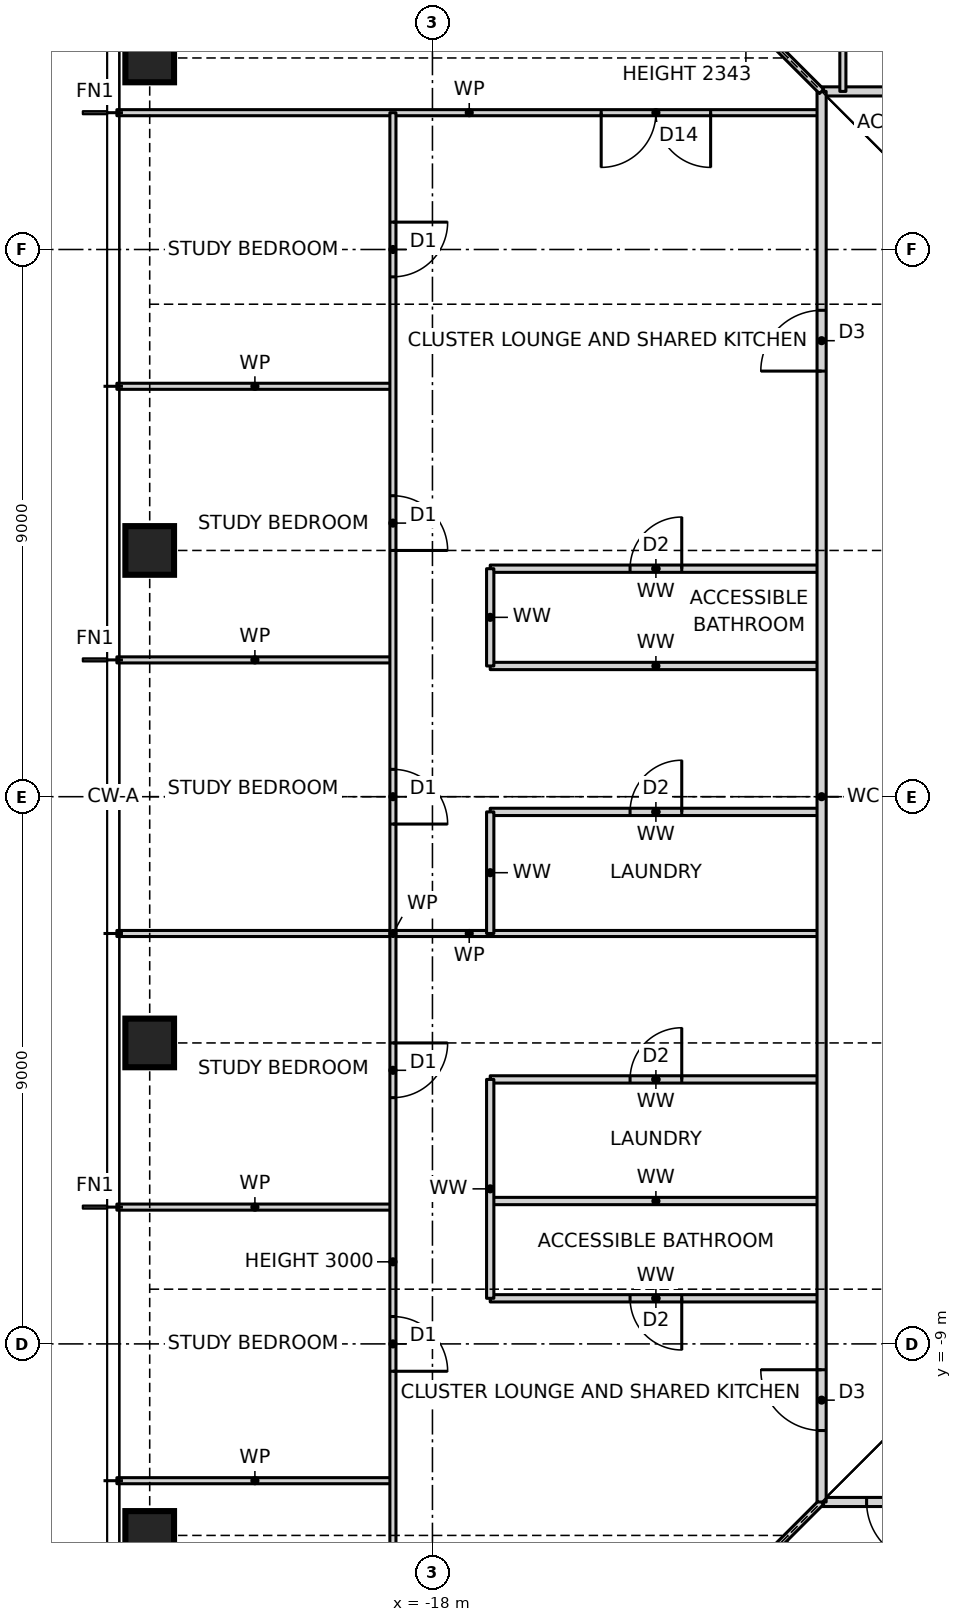
"""IFC4 building model, lengths in metres.
Left out: names, types, materials, properties, quantities, classifications, styles, units other than length and angle.
Written with IfcOpenShell. Run it as: python <this file> out.ifc"""

import sys

from ifc_helpers import new_model, si_unit, direction, frame, frame_2d, origin, origin_2d, place, context, subcontext, project, spatial, rectangle, hollow_rectangle, extrude, element, fill, save


model = new_model("IFC4")
c1 = context("Model", 3, precision=1e-05, world=origin(), true_north=direction((0.0, 1.0)))
c2 = subcontext(c1, "Body", "Model", "MODEL_VIEW")
j1 = project(units=[si_unit("LENGTHUNIT", "METRE"), si_unit("PLANEANGLEUNIT", "RADIAN")], contexts=[c1])
p1 = place(None, origin())
s1 = spatial("IfcSite", under=j1, at=p1, CompositionType="ELEMENT")
p2 = place(p1, origin())
s2 = spatial("IfcBuilding", under=s1, at=p2, CompositionType="ELEMENT")
p3 = place(p2, frame((0.0, 0.0, 67.5)))
s3 = spatial("IfcBuildingStorey", under=s2, at=p3, CompositionType="ELEMENT", Elevation=67.5)
for number, where, z_axis, x_axis in (
    (1, (-22.65, 12.15, 0.0), (0.0, 0.0, 1.0), (1.0, 0.0, 0.0)),
    (2, (-22.65, 4.05, 0.0), (0.0, 0.0, 1.0), (1.0, 0.0, 0.0)),
    (3, (-22.65, -4.05, 0.0), (0.0, 0.0, 1.0), (1.0, 0.0, 0.0)),
    (4, (-22.65, -12.15, 0.0), (0.0, 0.0, 1.0), (1.0, 0.0, 0.0)),
):
    element("IfcColumn", number, at=place(p3, frame(where, z_axis=z_axis, x_axis=x_axis)), inside=s3, PredefinedType="COLUMN", context=c2, shape_type="SweptSolid", body=[
        extrude(hollow_rectangle(XDim=0.8, YDim=0.8, WallThickness=0.09, at=origin_2d()), origin(), (0.0, 0.0, 1.0), 3.5),
    ])
p4 = place(p3, frame((-11.6, -11.6, 0.0), z_axis=(0.0, 0.0, 1.0), x_axis=(1.0, 0.0, 0.0)))
e5 = element("IfcWall", 5, at=p4, inside=s3, PredefinedType="PARTITIONING", context=c2, shape_type="SweptSolid", body=[
    extrude(rectangle(XDim=24.2, YDim=0.15, at=frame_2d((12.1, 0.0))), origin(), (0.0, 0.0, 1.0), 3.27),
])
p5 = place(p4, frame((0.74, 0.0, 0.0)))
e6 = element("IfcOpeningElement", 6, at=p5, cuts=e5, PredefinedType="OPENING", context=c2, shape_type="SweptSolid", body=[
    extrude(rectangle(XDim=1.0, YDim=2.1, at=frame_2d((0.5, 1.05))), frame((0.0, 0.085, 0.0), z_axis=(0.0, -1.0, 0.0), x_axis=(1.0, 0.0, 0.0)), (0.0, 0.0, 1.0), 0.17),
])
p6 = place(p4, frame((21.025, 0.0, 0.0)))
e7 = element("IfcOpeningElement", 7, at=p6, cuts=e5, PredefinedType="OPENING", context=c2, shape_type="SweptSolid", body=[
    extrude(rectangle(XDim=1.0, YDim=2.1, at=frame_2d((0.5, 1.05))), frame((0.0, 0.085, 0.0), z_axis=(0.0, -1.0, 0.0), x_axis=(1.0, 0.0, 0.0)), (0.0, 0.0, 1.0), 0.17),
])
p7 = place(p3, frame((-23.19, -11.25, 0.0), z_axis=(0.0, 0.0, 1.0), x_axis=(1.0, 0.0, 0.0)))
e8 = element("IfcWall", 8, at=p7, inside=s3, PredefinedType="PARTITIONING", context=c2, shape_type="SweptSolid", body=[
    extrude(rectangle(XDim=4.54, YDim=0.1, at=frame_2d((2.27, 0.0))), origin(), (0.0, 0.0, 1.0), 3.27),
])
p8 = place(p3, frame((-17.05, -8.25, 0.0), z_axis=(0.0, 0.0, 1.0), x_axis=(1.0, 0.0, 0.0)))
e9 = element("IfcWall", 9, at=p8, inside=s3, PredefinedType="PARTITIONING", context=c2, shape_type="SweptSolid", body=[
    extrude(rectangle(XDim=5.45, YDim=0.12, at=frame_2d((2.725, 0.0))), origin(), (0.0, 0.0, 1.0), 3.27),
])
p9 = place(p8, frame((2.3, 0.0, 0.0)))
e10 = element("IfcOpeningElement", 10, at=p9, cuts=e9, PredefinedType="OPENING", context=c2, shape_type="SweptSolid", body=[
    extrude(rectangle(XDim=0.85, YDim=2.1, at=frame_2d((0.425, 1.05))), frame((0.0, 0.07, 0.0), z_axis=(0.0, -1.0, 0.0), x_axis=(1.0, 0.0, 0.0)), (0.0, 0.0, 1.0), 0.14),
])
p10 = place(p3, frame((-23.19, -6.75, 0.0), z_axis=(0.0, 0.0, 1.0), x_axis=(1.0, 0.0, 0.0)))
e11 = element("IfcWall", 11, at=p10, inside=s3, PredefinedType="PARTITIONING", context=c2, shape_type="SweptSolid", body=[
    extrude(rectangle(XDim=4.54, YDim=0.1, at=frame_2d((2.27, 0.0))), origin(), (0.0, 0.0, 1.0), 3.27),
])
p11 = place(p3, frame((-17.05, -6.65, 0.0), z_axis=(0.0, 0.0, 1.0), x_axis=(1.0, 0.0, 0.0)))
e12 = element("IfcWall", 12, at=p11, inside=s3, PredefinedType="PARTITIONING", context=c2, shape_type="SweptSolid", body=[
    extrude(rectangle(XDim=5.45, YDim=0.12, at=frame_2d((2.725, 0.0))), origin(), (0.0, 0.0, 1.0), 3.27),
])
p12 = place(p3, frame((-17.05, -4.65, 0.0), z_axis=(0.0, 0.0, 1.0), x_axis=(1.0, 0.0, 0.0)))
e13 = element("IfcWall", 13, at=p12, inside=s3, PredefinedType="PARTITIONING", context=c2, shape_type="SweptSolid", body=[
    extrude(rectangle(XDim=5.45, YDim=0.12, at=frame_2d((2.725, 0.0))), origin(), (0.0, 0.0, 1.0), 3.27),
])
p13 = place(p12, frame((2.3, 0.0, 0.0)))
e14 = element("IfcOpeningElement", 14, at=p13, cuts=e13, PredefinedType="OPENING", context=c2, shape_type="SweptSolid", body=[
    extrude(rectangle(XDim=0.85, YDim=2.1, at=frame_2d((0.425, 1.05))), frame((0.0, 0.07, 0.0), z_axis=(0.0, -1.0, 0.0), x_axis=(1.0, 0.0, 0.0)), (0.0, 0.0, 1.0), 0.14),
])
p14 = place(p3, frame((-23.19, -2.25, 0.0), z_axis=(0.0, 0.0, 1.0), x_axis=(1.0, 0.0, 0.0)))
e15 = element("IfcWall", 15, at=p14, inside=s3, PredefinedType="PARTITIONING", context=c2, shape_type="SweptSolid", body=[
    extrude(rectangle(XDim=11.59, YDim=0.1, at=frame_2d((5.795, 0.0))), origin(), (0.0, 0.0, 1.0), 3.27),
])
p15 = place(p3, frame((-17.05, -0.25, 0.0), z_axis=(0.0, 0.0, 1.0), x_axis=(1.0, 0.0, 0.0)))
e16 = element("IfcWall", 16, at=p15, inside=s3, PredefinedType="PARTITIONING", context=c2, shape_type="SweptSolid", body=[
    extrude(rectangle(XDim=5.45, YDim=0.12, at=frame_2d((2.725, 0.0))), origin(), (0.0, 0.0, 1.0), 3.27),
])
p16 = place(p15, frame((2.3, 0.0, 0.0)))
e17 = element("IfcOpeningElement", 17, at=p16, cuts=e16, PredefinedType="OPENING", context=c2, shape_type="SweptSolid", body=[
    extrude(rectangle(XDim=0.85, YDim=2.1, at=frame_2d((0.425, 1.05))), frame((0.0, 0.07, 0.0), z_axis=(0.0, -1.0, 0.0), x_axis=(1.0, 0.0, 0.0)), (0.0, 0.0, 1.0), 0.14),
])
p17 = place(p3, frame((-17.05, 2.15, 0.0), z_axis=(0.0, 0.0, 1.0), x_axis=(1.0, 0.0, 0.0)))
e18 = element("IfcWall", 18, at=p17, inside=s3, PredefinedType="PARTITIONING", context=c2, shape_type="SweptSolid", body=[
    extrude(rectangle(XDim=5.45, YDim=0.12, at=frame_2d((2.725, 0.0))), origin(), (0.0, 0.0, 1.0), 3.27),
])
p18 = place(p3, frame((-23.19, 2.25, 0.0), z_axis=(0.0, 0.0, 1.0), x_axis=(1.0, 0.0, 0.0)))
e19 = element("IfcWall", 19, at=p18, inside=s3, PredefinedType="PARTITIONING", context=c2, shape_type="SweptSolid", body=[
    extrude(rectangle(XDim=4.54, YDim=0.1, at=frame_2d((2.27, 0.0))), origin(), (0.0, 0.0, 1.0), 3.27),
])
p19 = place(p3, frame((-17.05, 3.75, 0.0), z_axis=(0.0, 0.0, 1.0), x_axis=(1.0, 0.0, 0.0)))
e20 = element("IfcWall", 20, at=p19, inside=s3, PredefinedType="PARTITIONING", context=c2, shape_type="SweptSolid", body=[
    extrude(rectangle(XDim=5.45, YDim=0.12, at=frame_2d((2.725, 0.0))), origin(), (0.0, 0.0, 1.0), 3.27),
])
p20 = place(p19, frame((2.3, 0.0, 0.0)))
e21 = element("IfcOpeningElement", 21, at=p20, cuts=e20, PredefinedType="OPENING", context=c2, shape_type="SweptSolid", body=[
    extrude(rectangle(XDim=0.85, YDim=2.1, at=frame_2d((0.425, 1.05))), frame((0.0, 0.07, 0.0), z_axis=(0.0, -1.0, 0.0), x_axis=(1.0, 0.0, 0.0)), (0.0, 0.0, 1.0), 0.14),
])
p21 = place(p3, frame((-23.19, 6.75, 0.0), z_axis=(0.0, 0.0, 1.0), x_axis=(1.0, 0.0, 0.0)))
e22 = element("IfcWall", 22, at=p21, inside=s3, PredefinedType="PARTITIONING", context=c2, shape_type="SweptSolid", body=[
    extrude(rectangle(XDim=4.54, YDim=0.1, at=frame_2d((2.27, 0.0))), origin(), (0.0, 0.0, 1.0), 3.27),
])
p22 = place(p3, frame((-23.19, 11.25, 0.0), z_axis=(0.0, 0.0, 1.0), x_axis=(1.0, 0.0, 0.0)))
e23 = element("IfcWall", 23, at=p22, inside=s3, PredefinedType="PARTITIONING", context=c2, shape_type="SweptSolid", body=[
    extrude(rectangle(XDim=11.59, YDim=0.1, at=frame_2d((5.795, 0.0))), origin(), (0.0, 0.0, 1.0), 3.27),
])
p23 = place(p22, frame((7.965, 0.0, 0.0)))
e24 = element("IfcOpeningElement", 24, at=p23, cuts=e23, PredefinedType="OPENING", context=c2, shape_type="SweptSolid", body=[
    extrude(rectangle(XDim=1.8, YDim=2.1, at=frame_2d((0.9, 1.05))), frame((0.0, 0.06, 0.0), z_axis=(0.0, -1.0, 0.0), x_axis=(1.0, 0.0, 0.0)), (0.0, 0.0, 1.0), 0.12),
])
p24 = place(p3, frame((-11.6, 11.6, 0.0), z_axis=(0.0, 0.0, 1.0), x_axis=(1.0, 0.0, 0.0)))
e25 = element("IfcWall", 25, at=p24, inside=s3, PredefinedType="PARTITIONING", context=c2, shape_type="SweptSolid", body=[
    extrude(rectangle(XDim=24.2, YDim=0.15, at=frame_2d((12.1, 0.0))), origin(), (0.0, 0.0, 1.0), 3.27),
])
p25 = place(p24, frame((7.95, 0.0, 0.0)))
e26 = element("IfcOpeningElement", 26, at=p25, cuts=e25, PredefinedType="OPENING", context=c2, shape_type="SweptSolid", body=[
    extrude(rectangle(XDim=1.0, YDim=2.1, at=frame_2d((0.5, 1.05))), frame((0.0, 0.085, 0.0), z_axis=(0.0, -1.0, 0.0), x_axis=(1.0, 0.0, 0.0)), (0.0, 0.0, 1.0), 0.17),
])
p26 = place(p24, frame((5.9, 0.0, 0.0)))
e27 = element("IfcOpeningElement", 27, at=p26, cuts=e25, PredefinedType="OPENING", context=c2, shape_type="SweptSolid", body=[
    extrude(rectangle(XDim=0.9, YDim=2.1, at=frame_2d((0.45, 1.05))), frame((0.0, 0.085, 0.0), z_axis=(0.0, -1.0, 0.0), x_axis=(1.0, 0.0, 0.0)), (0.0, 0.0, 1.0), 0.17),
])
p27 = place(p3, frame((-15.75, -15.75, 0.0), z_axis=(0.0, 0.0, 1.0), x_axis=(0.707106781187, 0.707106781187, 0.0)))
e28 = element("IfcWall", 28, at=p27, inside=s3, PredefinedType="PARTITIONING", context=c2, shape_type="SweptSolid", body=[
    extrude(rectangle(XDim=5.869, YDim=0.1, at=frame_2d((2.935, 0.0))), origin(), (0.0, 0.0, 1.0), 2.343),
])
p28 = place(p3, frame((-11.25, 11.6, 0.0), z_axis=(0.0, 0.0, 1.0), x_axis=(0.0, 1.0, 0.0)))
e29 = element("IfcWall", 29, at=p28, inside=s3, PredefinedType="PARTITIONING", context=c2, shape_type="SweptSolid", body=[
    extrude(rectangle(XDim=11.59, YDim=0.1, at=frame_2d((5.795, 0.0))), origin(), (0.0, 0.0, 1.0), 3.27),
])
p29 = place(p28, frame((5.825, 0.0, 0.0)))
e30 = element("IfcOpeningElement", 30, at=p29, cuts=e29, PredefinedType="OPENING", context=c2, shape_type="SweptSolid", body=[
    extrude(rectangle(XDim=0.85, YDim=2.1, at=frame_2d((0.425, 1.05))), frame((0.0, 0.06, 0.0), z_axis=(0.0, -1.0, 0.0), x_axis=(1.0, 0.0, 0.0)), (0.0, 0.0, 1.0), 0.12),
])
p30 = place(p3, frame((-11.6, -11.6, 0.0), z_axis=(0.0, 0.0, 1.0), x_axis=(0.0, 1.0, 0.0)))
e31 = element("IfcWall", 31, at=p30, inside=s3, PredefinedType="PARTITIONING", context=c2, shape_type="SweptSolid", body=[
    extrude(rectangle(XDim=23.2, YDim=0.15, at=frame_2d((11.6, 0.0))), origin(), (0.0, 0.0, 1.0), 3.27),
])
p31 = place(p30, frame((18.6, 0.0, 0.0)))
e32 = element("IfcOpeningElement", 32, at=p31, cuts=e31, PredefinedType="OPENING", context=c2, shape_type="SweptSolid", body=[
    extrude(rectangle(XDim=1.0, YDim=2.1, at=frame_2d((0.5, 1.05))), frame((0.0, 0.085, 0.0), z_axis=(0.0, -1.0, 0.0), x_axis=(1.0, 0.0, 0.0)), (0.0, 0.0, 1.0), 0.17),
])
p32 = place(p30, frame((1.175, 0.0, 0.0)))
e33 = element("IfcOpeningElement", 33, at=p32, cuts=e31, PredefinedType="OPENING", context=c2, shape_type="SweptSolid", body=[
    extrude(rectangle(XDim=1.0, YDim=2.1, at=frame_2d((0.5, 1.05))), frame((0.0, 0.085, 0.0), z_axis=(0.0, -1.0, 0.0), x_axis=(1.0, 0.0, 0.0)), (0.0, 0.0, 1.0), 0.17),
])
p33 = place(p3, frame((-17.05, -8.25, 0.0), z_axis=(0.0, 0.0, 1.0), x_axis=(0.0, 1.0, 0.0)))
e34 = element("IfcWall", 34, at=p33, inside=s3, PredefinedType="PARTITIONING", context=c2, shape_type="SweptSolid", body=[
    extrude(rectangle(XDim=3.6, YDim=0.12, at=frame_2d((1.8, 0.0))), origin(), (0.0, 0.0, 1.0), 3.27),
])
p34 = place(p3, frame((-17.05, -2.25, 0.0), z_axis=(0.0, 0.0, 1.0), x_axis=(0.0, 1.0, 0.0)))
e35 = element("IfcWall", 35, at=p34, inside=s3, PredefinedType="PARTITIONING", context=c2, shape_type="SweptSolid", body=[
    extrude(rectangle(XDim=2.0, YDim=0.12, at=frame_2d((1.0, 0.0))), origin(), (0.0, 0.0, 1.0), 3.27),
])
p35 = place(p3, frame((-17.05, 2.15, 0.0), z_axis=(0.0, 0.0, 1.0), x_axis=(0.0, 1.0, 0.0)))
e36 = element("IfcWall", 36, at=p35, inside=s3, PredefinedType="PARTITIONING", context=c2, shape_type="SweptSolid", body=[
    extrude(rectangle(XDim=1.6, YDim=0.12, at=frame_2d((0.8, 0.0))), origin(), (0.0, 0.0, 1.0), 3.27),
])
p36 = place(p3, frame((-18.65, -15.75, 0.0), z_axis=(0.0, 0.0, 1.0), x_axis=(0.0, 1.0, 0.0)))
e37 = element("IfcWall", 37, at=p36, inside=s3, PredefinedType="PARTITIONING", context=c2, shape_type="SweptSolid", body=[
    extrude(rectangle(XDim=27.0, YDim=0.1, at=frame_2d((13.5, 0.0))), origin(), (0.0, 0.0, 1.0), 3.0),
])
p37 = place(p36, frame((24.3, 0.0, 0.0)))
e38 = element("IfcOpeningElement", 38, at=p37, cuts=e37, PredefinedType="OPENING", context=c2, shape_type="SweptSolid", body=[
    extrude(rectangle(XDim=0.9, YDim=2.1, at=frame_2d((0.45, 1.05))), frame((0.0, 0.06, 0.0), z_axis=(0.0, -1.0, 0.0), x_axis=(1.0, 0.0, 0.0)), (0.0, 0.0, 1.0), 0.12),
])
p38 = place(p36, frame((19.8, 0.0, 0.0)))
e39 = element("IfcOpeningElement", 39, at=p38, cuts=e37, PredefinedType="OPENING", context=c2, shape_type="SweptSolid", body=[
    extrude(rectangle(XDim=0.9, YDim=2.1, at=frame_2d((0.45, 1.05))), frame((0.0, 0.06, 0.0), z_axis=(0.0, -1.0, 0.0), x_axis=(1.0, 0.0, 0.0)), (0.0, 0.0, 1.0), 0.12),
])
p39 = place(p36, frame((15.3, 0.0, 0.0)))
e40 = element("IfcOpeningElement", 40, at=p39, cuts=e37, PredefinedType="OPENING", context=c2, shape_type="SweptSolid", body=[
    extrude(rectangle(XDim=0.9, YDim=2.1, at=frame_2d((0.45, 1.05))), frame((0.0, 0.06, 0.0), z_axis=(0.0, -1.0, 0.0), x_axis=(1.0, 0.0, 0.0)), (0.0, 0.0, 1.0), 0.12),
])
p40 = place(p36, frame((10.8, 0.0, 0.0)))
e41 = element("IfcOpeningElement", 41, at=p40, cuts=e37, PredefinedType="OPENING", context=c2, shape_type="SweptSolid", body=[
    extrude(rectangle(XDim=0.9, YDim=2.1, at=frame_2d((0.45, 1.05))), frame((0.0, 0.06, 0.0), z_axis=(0.0, -1.0, 0.0), x_axis=(1.0, 0.0, 0.0)), (0.0, 0.0, 1.0), 0.12),
])
p41 = place(p36, frame((6.3, 0.0, 0.0)))
e42 = element("IfcOpeningElement", 42, at=p41, cuts=e37, PredefinedType="OPENING", context=c2, shape_type="SweptSolid", body=[
    extrude(rectangle(XDim=0.9, YDim=2.1, at=frame_2d((0.45, 1.05))), frame((0.0, 0.06, 0.0), z_axis=(0.0, -1.0, 0.0), x_axis=(1.0, 0.0, 0.0)), (0.0, 0.0, 1.0), 0.12),
])
p42 = place(p36, frame((1.8, 0.0, 0.0)))
e43 = element("IfcOpeningElement", 43, at=p42, cuts=e37, PredefinedType="OPENING", context=c2, shape_type="SweptSolid", body=[
    extrude(rectangle(XDim=0.9, YDim=2.1, at=frame_2d((0.45, 1.05))), frame((0.0, 0.06, 0.0), z_axis=(0.0, -1.0, 0.0), x_axis=(1.0, 0.0, 0.0)), (0.0, 0.0, 1.0), 0.12),
])
p43 = place(p3, frame((-11.6, 11.6, 0.0), z_axis=(0.0, 0.0, 1.0), x_axis=(-0.707106781187, 0.707106781187, 0.0)))
e44 = element("IfcWall", 44, at=p43, inside=s3, PredefinedType="PARTITIONING", context=c2, shape_type="SweptSolid", body=[
    extrude(rectangle(XDim=5.869, YDim=0.1, at=frame_2d((2.935, 0.0))), origin(), (0.0, 0.0, 1.0), 2.343),
])
p44 = place(p5, frame((1.0, 0.0, 0.0), z_axis=(0.0, 0.0, 1.0), x_axis=(-1.0, 0.0, 0.0)))
e45 = element("IfcDoor", 45, at=p44, inside=s3, OperationType="SINGLE_SWING_LEFT", PredefinedType="DOOR", context=c2, shape_type="SweptSolid", body=[
    extrude(rectangle(XDim=1.0, YDim=2.1, at=frame_2d((0.5, 1.05))), frame((0.0, 0.025, 0.0), z_axis=(0.0, -1.0, 0.0), x_axis=(1.0, 0.0, 0.0)), (0.0, 0.0, 1.0), 0.05),
])
fill(e6, e45)
p45 = place(p23, frame((1.8, 0.0, 0.0), z_axis=(0.0, 0.0, 1.0), x_axis=(-1.0, 0.0, 0.0)))
e46 = element("IfcDoor", 46, at=p45, inside=s3, OperationType="DOUBLE_DOOR_SINGLE_SWING", PredefinedType="DOOR", context=c2, shape_type="SweptSolid", body=[
    extrude(rectangle(XDim=1.8, YDim=2.1, at=frame_2d((0.9, 1.05))), frame((0.0, 0.025, 0.0), z_axis=(0.0, -1.0, 0.0), x_axis=(1.0, 0.0, 0.0)), (0.0, 0.0, 1.0), 0.05),
])
fill(e24, e46)
p46 = place(p37, frame((0.9, 0.0, 0.0), z_axis=(0.0, 0.0, 1.0), x_axis=(-1.0, 0.0, 0.0)))
e47 = element("IfcDoor", 47, at=p46, inside=s3, OperationType="SINGLE_SWING_LEFT", PredefinedType="DOOR", context=c2, shape_type="SweptSolid", body=[
    extrude(rectangle(XDim=0.9, YDim=2.1, at=frame_2d((0.45, 1.05))), frame((0.0, 0.025, 0.0), z_axis=(0.0, -1.0, 0.0), x_axis=(1.0, 0.0, 0.0)), (0.0, 0.0, 1.0), 0.05),
])
fill(e38, e47)
p47 = place(p38, frame((0.9, 0.0, 0.0), z_axis=(0.0, 0.0, 1.0), x_axis=(-1.0, 0.0, 0.0)))
e48 = element("IfcDoor", 48, at=p47, inside=s3, OperationType="SINGLE_SWING_RIGHT", PredefinedType="DOOR", context=c2, shape_type="SweptSolid", body=[
    extrude(rectangle(XDim=0.9, YDim=2.1, at=frame_2d((0.45, 1.05))), frame((0.0, 0.025, 0.0), z_axis=(0.0, -1.0, 0.0), x_axis=(1.0, 0.0, 0.0)), (0.0, 0.0, 1.0), 0.05),
])
fill(e39, e48)
p48 = place(p39, frame((0.9, 0.0, 0.0), z_axis=(0.0, 0.0, 1.0), x_axis=(-1.0, 0.0, 0.0)))
e49 = element("IfcDoor", 49, at=p48, inside=s3, OperationType="SINGLE_SWING_RIGHT", PredefinedType="DOOR", context=c2, shape_type="SweptSolid", body=[
    extrude(rectangle(XDim=0.9, YDim=2.1, at=frame_2d((0.45, 1.05))), frame((0.0, 0.025, 0.0), z_axis=(0.0, -1.0, 0.0), x_axis=(1.0, 0.0, 0.0)), (0.0, 0.0, 1.0), 0.05),
])
fill(e40, e49)
p49 = place(p31, origin())
e50 = element("IfcDoor", 50, at=p49, inside=s3, OperationType="SINGLE_SWING_LEFT", PredefinedType="DOOR", context=c2, shape_type="SweptSolid", body=[
    extrude(rectangle(XDim=1.0, YDim=2.1, at=frame_2d((0.5, 1.05))), frame((0.0, 0.025, 0.0), z_axis=(0.0, -1.0, 0.0), x_axis=(1.0, 0.0, 0.0)), (0.0, 0.0, 1.0), 0.05),
])
fill(e32, e50)
p50 = place(p20, origin())
e51 = element("IfcDoor", 51, at=p50, inside=s3, OperationType="SINGLE_SWING_RIGHT", PredefinedType="DOOR", context=c2, shape_type="SweptSolid", body=[
    extrude(rectangle(XDim=0.85, YDim=2.1, at=frame_2d((0.425, 1.05))), frame((0.0, 0.025, 0.0), z_axis=(0.0, -1.0, 0.0), x_axis=(1.0, 0.0, 0.0)), (0.0, 0.0, 1.0), 0.05),
])
fill(e21, e51)
p51 = place(p16, origin())
e52 = element("IfcDoor", 52, at=p51, inside=s3, OperationType="SINGLE_SWING_RIGHT", PredefinedType="DOOR", context=c2, shape_type="SweptSolid", body=[
    extrude(rectangle(XDim=0.85, YDim=2.1, at=frame_2d((0.425, 1.05))), frame((0.0, 0.025, 0.0), z_axis=(0.0, -1.0, 0.0), x_axis=(1.0, 0.0, 0.0)), (0.0, 0.0, 1.0), 0.05),
])
fill(e17, e52)
p52 = place(p40, frame((0.9, 0.0, 0.0), z_axis=(0.0, 0.0, 1.0), x_axis=(-1.0, 0.0, 0.0)))
e53 = element("IfcDoor", 53, at=p52, inside=s3, OperationType="SINGLE_SWING_LEFT", PredefinedType="DOOR", context=c2, shape_type="SweptSolid", body=[
    extrude(rectangle(XDim=0.9, YDim=2.1, at=frame_2d((0.45, 1.05))), frame((0.0, 0.025, 0.0), z_axis=(0.0, -1.0, 0.0), x_axis=(1.0, 0.0, 0.0)), (0.0, 0.0, 1.0), 0.05),
])
fill(e41, e53)
p53 = place(p41, frame((0.9, 0.0, 0.0), z_axis=(0.0, 0.0, 1.0), x_axis=(-1.0, 0.0, 0.0)))
e54 = element("IfcDoor", 54, at=p53, inside=s3, OperationType="SINGLE_SWING_RIGHT", PredefinedType="DOOR", context=c2, shape_type="SweptSolid", body=[
    extrude(rectangle(XDim=0.9, YDim=2.1, at=frame_2d((0.45, 1.05))), frame((0.0, 0.025, 0.0), z_axis=(0.0, -1.0, 0.0), x_axis=(1.0, 0.0, 0.0)), (0.0, 0.0, 1.0), 0.05),
])
fill(e42, e54)
p54 = place(p32, origin())
e55 = element("IfcDoor", 55, at=p54, inside=s3, OperationType="SINGLE_SWING_RIGHT", PredefinedType="DOOR", context=c2, shape_type="SweptSolid", body=[
    extrude(rectangle(XDim=1.0, YDim=2.1, at=frame_2d((0.5, 1.05))), frame((0.0, 0.025, 0.0), z_axis=(0.0, -1.0, 0.0), x_axis=(1.0, 0.0, 0.0)), (0.0, 0.0, 1.0), 0.05),
])
fill(e33, e55)
p55 = place(p13, origin())
e56 = element("IfcDoor", 56, at=p55, inside=s3, OperationType="SINGLE_SWING_RIGHT", PredefinedType="DOOR", context=c2, shape_type="SweptSolid", body=[
    extrude(rectangle(XDim=0.85, YDim=2.1, at=frame_2d((0.425, 1.05))), frame((0.0, 0.025, 0.0), z_axis=(0.0, -1.0, 0.0), x_axis=(1.0, 0.0, 0.0)), (0.0, 0.0, 1.0), 0.05),
])
fill(e14, e56)
p56 = place(p9, frame((0.85, 0.0, 0.0), z_axis=(0.0, 0.0, 1.0), x_axis=(-1.0, 0.0, 0.0)))
e57 = element("IfcDoor", 57, at=p56, inside=s3, OperationType="SINGLE_SWING_LEFT", PredefinedType="DOOR", context=c2, shape_type="SweptSolid", body=[
    extrude(rectangle(XDim=0.85, YDim=2.1, at=frame_2d((0.425, 1.05))), frame((0.0, 0.025, 0.0), z_axis=(0.0, -1.0, 0.0), x_axis=(1.0, 0.0, 0.0)), (0.0, 0.0, 1.0), 0.05),
])
fill(e10, e57)
save(model, sys.argv[1])
